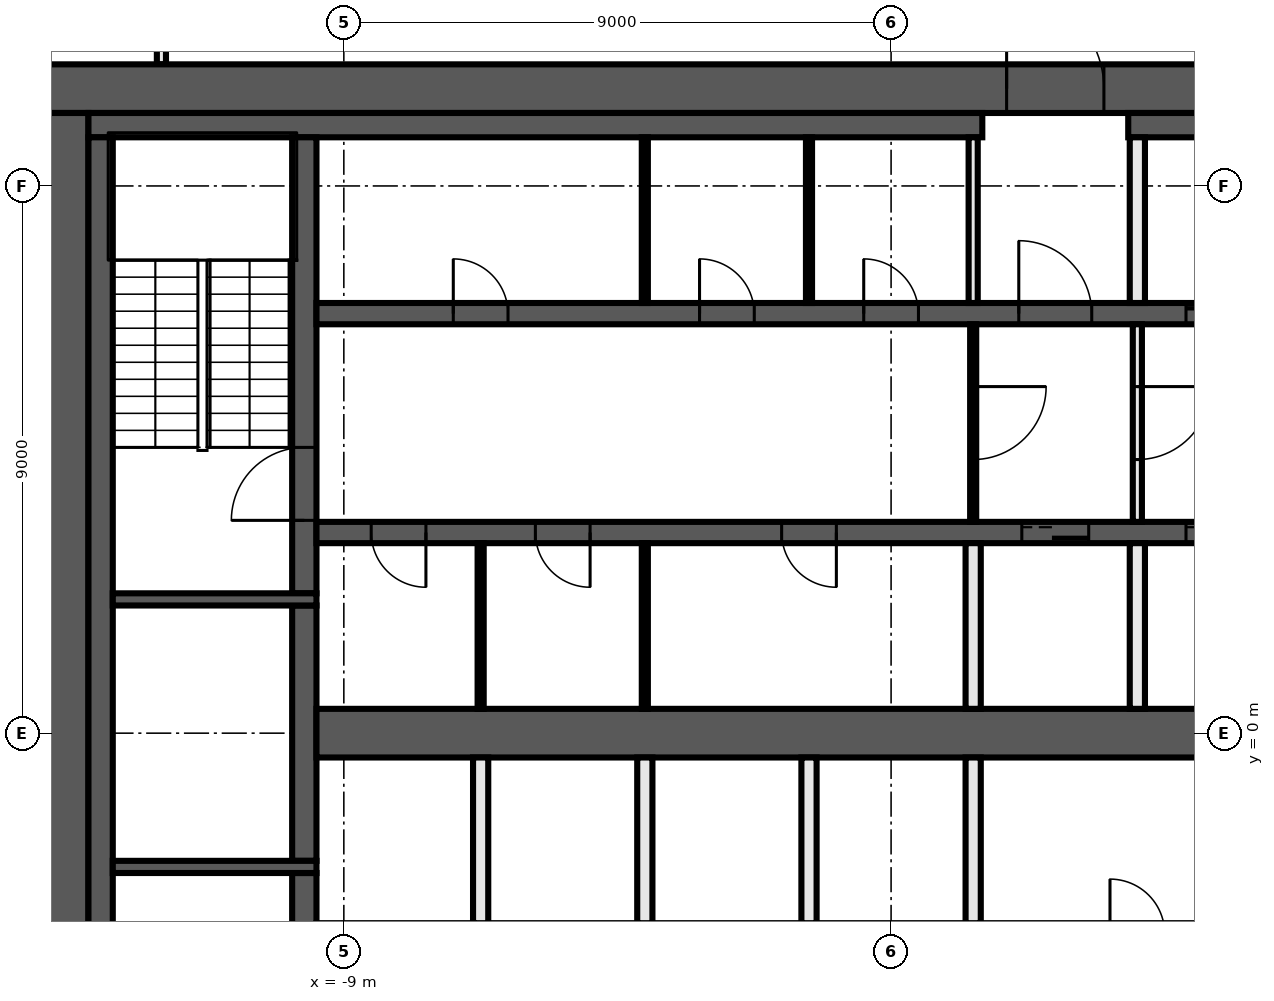
"""IFC4 building model, lengths in metres.
Left out: names, types, materials, properties, quantities, classifications, styles, units other than length and angle.
Written with IfcOpenShell. Run it as: python <this file> out.ifc"""

import sys

from ifc_helpers import new_model, si_unit, direction, frame, frame_2d, origin, place, context, subcontext, project, spatial, rectangle, extrude, element, fill, save


model = new_model("IFC4")
c1 = context("Model", 3, precision=1e-05, world=origin(), true_north=direction((0.0, 1.0)))
c2 = subcontext(c1, "Body", "Model", "MODEL_VIEW")
j1 = project(units=[si_unit("LENGTHUNIT", "METRE"), si_unit("PLANEANGLEUNIT", "RADIAN")], contexts=[c1])
p1 = place(None, origin())
s1 = spatial("IfcSite", under=j1, at=p1, CompositionType="ELEMENT")
p2 = place(p1, origin())
s2 = spatial("IfcBuilding", under=s1, at=p2, CompositionType="ELEMENT")
p3 = place(p2, frame((0.0, 0.0, 211.4)))
s3 = spatial("IfcBuildingStorey", under=s2, at=p3, CompositionType="ELEMENT", Elevation=211.4)
p4 = place(p3, frame((-12.0, 11.0, 0.0), z_axis=(0.0, 0.0, 1.0), x_axis=(0.0, 1.0, 0.0)))
e1 = element("IfcWall", 1, at=p4, inside=s3, PredefinedType="PARTITIONING", context=c2, shape_type="SweptSolid", body=[
    extrude(rectangle(XDim=2.725, YDim=0.15, at=frame_2d((1.363, 0.0))), origin(), (0.0, 0.0, 1.0), 3.82),
])
p5 = place(p3, frame((-14.0, 10.6, 0.0), z_axis=(0.0, 0.0, 1.0), x_axis=(1.0, 0.0, 0.0)))
e2 = element("IfcWall", 2, at=p5, inside=s3, PredefinedType="SHEAR", context=c2, shape_type="SweptSolid", body=[
    extrude(rectangle(XDim=28.0, YDim=0.8, at=frame_2d((14.0, 0.0))), origin(), (0.0, 0.0, 1.0), 3.82),
])
p6 = place(p5, frame((15.9, 0.0, 0.0)))
e3 = element("IfcOpeningElement", 3, at=p6, cuts=e2, PredefinedType="OPENING", context=c2, shape_type="SweptSolid", body=[
    extrude(rectangle(XDim=1.6, YDim=2.1, at=frame_2d((0.8, 1.05))), frame((0.0, 0.41, 0.0), z_axis=(0.0, -1.0, 0.0), x_axis=(1.0, 0.0, 0.0)), (0.0, 0.0, 1.0), 0.82),
])
p7 = place(p3, frame((-13.6, -10.2, 0.0), z_axis=(0.0, 0.0, 1.0), x_axis=(0.0, 1.0, 0.0)))
e4 = element("IfcWall", 4, at=p7, inside=s3, PredefinedType="SHEAR", context=c2, shape_type="SweptSolid", body=[
    extrude(rectangle(XDim=20.4, YDim=0.8, at=frame_2d((10.2, 0.0))), origin(), (0.0, 0.0, 1.0), 3.82),
])
p8 = place(p3, frame((-13.2, 10.0, 0.0), z_axis=(0.0, 0.0, 1.0), x_axis=(1.0, 0.0, 0.0)))
e5 = element("IfcWall", 5, at=p8, inside=s3, PredefinedType="SHEAR", context=c2, shape_type="SweptSolid", body=[
    extrude(rectangle(XDim=14.7, YDim=0.4, at=frame_2d((7.35, 0.0))), origin(), (0.0, 0.0, 1.0), 3.82),
])
p9 = place(p3, frame((3.9, 10.0, 0.0), z_axis=(0.0, 0.0, 1.0), x_axis=(1.0, 0.0, 0.0)))
e6 = element("IfcWall", 6, at=p9, inside=s3, PredefinedType="SHEAR", context=c2, shape_type="SweptSolid", body=[
    extrude(rectangle(XDim=9.3, YDim=0.4, at=frame_2d((4.65, 0.0))), origin(), (0.0, 0.0, 1.0), 3.82),
])
p10 = place(p3, frame((-13.0, -9.8, 0.0), z_axis=(0.0, 0.0, 1.0), x_axis=(0.0, 1.0, 0.0)))
e7 = element("IfcWall", 7, at=p10, inside=s3, PredefinedType="SHEAR", context=c2, shape_type="SweptSolid", body=[
    extrude(rectangle(XDim=19.6, YDim=0.4, at=frame_2d((9.8, 0.0))), origin(), (0.0, 0.0, 1.0), 3.82),
])
p11 = place(p3, frame((-9.65, -9.8, 0.0), z_axis=(0.0, 0.0, 1.0), x_axis=(0.0, 1.0, 0.0)))
e8 = element("IfcWall", 8, at=p11, inside=s3, PredefinedType="SHEAR", context=c2, shape_type="SweptSolid", body=[
    extrude(rectangle(XDim=7.5, YDim=0.4, at=frame_2d((3.75, 0.0))), origin(), (0.0, 0.0, 1.0), 3.82),
])
p12 = place(p11, frame((5.1, 0.0, 0.0)))
e9 = element("IfcOpeningElement", 9, at=p12, cuts=e8, PredefinedType="OPENING", context=c2, shape_type="SweptSolid", body=[
    extrude(rectangle(XDim=1.2, YDim=2.1, at=frame_2d((0.6, 1.05))), frame((0.0, 0.21, 0.0), z_axis=(0.0, -1.0, 0.0), x_axis=(1.0, 0.0, 0.0)), (0.0, 0.0, 1.0), 0.42),
])
p13 = place(p3, frame((-9.65, -2.1, 0.0), z_axis=(0.0, 0.0, 1.0), x_axis=(0.0, 1.0, 0.0)))
e10 = element("IfcWall", 10, at=p13, inside=s3, PredefinedType="SHEAR", context=c2, shape_type="SweptSolid", body=[
    extrude(rectangle(XDim=4.2, YDim=0.4, at=frame_2d((2.1, 0.0))), origin(), (0.0, 0.0, 1.0), 3.82),
])
p14 = place(p3, frame((-9.65, 2.3, 0.0), z_axis=(0.0, 0.0, 1.0), x_axis=(0.0, 1.0, 0.0)))
e11 = element("IfcWall", 11, at=p14, inside=s3, PredefinedType="SHEAR", context=c2, shape_type="SweptSolid", body=[
    extrude(rectangle(XDim=7.5, YDim=0.4, at=frame_2d((3.75, 0.0))), origin(), (0.0, 0.0, 1.0), 3.82),
])
p15 = place(p14, frame((1.2, 0.0, 0.0)))
e12 = element("IfcOpeningElement", 12, at=p15, cuts=e11, PredefinedType="OPENING", context=c2, shape_type="SweptSolid", body=[
    extrude(rectangle(XDim=1.2, YDim=2.1, at=frame_2d((0.6, 1.05))), frame((0.0, 0.21, 0.0), z_axis=(0.0, -1.0, 0.0), x_axis=(1.0, 0.0, 0.0)), (0.0, 0.0, 1.0), 0.42),
])
for number, where, z_axis, x_axis in (
    (13, (-9.45, 2.2, 0.0), (0.0, 0.0, 1.0), (-1.0, 0.0, 0.0)),
    (14, (-9.45, -2.2, 0.0), (0.0, 0.0, 1.0), (-1.0, 0.0, 0.0)),
):
    element("IfcWall", number, at=place(p3, frame(where, z_axis=z_axis, x_axis=x_axis)), inside=s3, PredefinedType="SHEAR", context=c2, shape_type="SweptSolid", body=[
        extrude(rectangle(XDim=3.35, YDim=0.2, at=frame_2d((1.675, 0.0))), origin(), (0.0, 0.0, 1.0), 3.82),
    ])
p16 = place(p3, frame((-9.45, 6.9, 0.0), z_axis=(0.0, 0.0, 1.0), x_axis=(1.0, 0.0, 0.0)))
e15 = element("IfcWall", 15, at=p16, inside=s3, PredefinedType="SHEAR", context=c2, shape_type="SweptSolid", body=[
    extrude(rectangle(XDim=18.9, YDim=0.35, at=frame_2d((9.45, 0.0))), origin(), (0.0, 0.0, 1.0), 3.82),
])
p17 = place(p16, frame((11.55, 0.0, 0.0)))
e16 = element("IfcOpeningElement", 16, at=p17, cuts=e15, PredefinedType="OPENING", context=c2, shape_type="SweptSolid", body=[
    extrude(rectangle(XDim=1.2, YDim=2.1, at=frame_2d((0.6, 1.05))), frame((0.0, 0.185, 0.0), z_axis=(0.0, -1.0, 0.0), x_axis=(1.0, 0.0, 0.0)), (0.0, 0.0, 1.0), 0.37),
])
p18 = place(p16, frame((14.3, 0.0, 0.0)))
e17 = element("IfcOpeningElement", 17, at=p18, cuts=e15, PredefinedType="OPENING", context=c2, shape_type="SweptSolid", body=[
    extrude(rectangle(XDim=1.1, YDim=2.1, at=frame_2d((0.55, 1.05))), frame((0.0, 0.185, 0.0), z_axis=(0.0, -1.0, 0.0), x_axis=(1.0, 0.0, 0.0)), (0.0, 0.0, 1.0), 0.37),
])
p19 = place(p16, frame((17.0, 0.0, 0.0)))
e18 = element("IfcOpeningElement", 18, at=p19, cuts=e15, PredefinedType="OPENING", context=c2, shape_type="SweptSolid", body=[
    extrude(rectangle(XDim=1.1, YDim=2.1, at=frame_2d((0.55, 1.05))), frame((0.0, 0.185, 0.0), z_axis=(0.0, -1.0, 0.0), x_axis=(1.0, 0.0, 0.0)), (0.0, 0.0, 1.0), 0.37),
])
p20 = place(p16, frame((2.25, 0.0, 0.0)))
e19 = element("IfcOpeningElement", 19, at=p20, cuts=e15, PredefinedType="OPENING", context=c2, shape_type="SweptSolid", body=[
    extrude(rectangle(XDim=0.9, YDim=2.1, at=frame_2d((0.45, 1.05))), frame((0.0, 0.185, 0.0), z_axis=(0.0, -1.0, 0.0), x_axis=(1.0, 0.0, 0.0)), (0.0, 0.0, 1.0), 0.37),
])
p21 = place(p16, frame((6.3, 0.0, 0.0)))
e20 = element("IfcOpeningElement", 20, at=p21, cuts=e15, PredefinedType="OPENING", context=c2, shape_type="SweptSolid", body=[
    extrude(rectangle(XDim=0.9, YDim=2.1, at=frame_2d((0.45, 1.05))), frame((0.0, 0.185, 0.0), z_axis=(0.0, -1.0, 0.0), x_axis=(1.0, 0.0, 0.0)), (0.0, 0.0, 1.0), 0.37),
])
p22 = place(p16, frame((9.0, 0.0, 0.0)))
e21 = element("IfcOpeningElement", 21, at=p22, cuts=e15, PredefinedType="OPENING", context=c2, shape_type="SweptSolid", body=[
    extrude(rectangle(XDim=0.9, YDim=2.1, at=frame_2d((0.45, 1.05))), frame((0.0, 0.185, 0.0), z_axis=(0.0, -1.0, 0.0), x_axis=(1.0, 0.0, 0.0)), (0.0, 0.0, 1.0), 0.37),
])
p23 = place(p3, frame((9.45, 3.3, 0.0), z_axis=(0.0, 0.0, 1.0), x_axis=(-1.0, 0.0, 0.0)))
e22 = element("IfcWall", 22, at=p23, inside=s3, PredefinedType="SHEAR", context=c2, shape_type="SweptSolid", body=[
    extrude(rectangle(XDim=18.9, YDim=0.35, at=frame_2d((9.45, 0.0))), origin(), (0.0, 0.0, 1.0), 3.82),
])
p24 = place(p23, frame((6.2, 0.0, 0.0)))
e23 = element("IfcOpeningElement", 23, at=p24, cuts=e22, PredefinedType="OPENING", context=c2, shape_type="SweptSolid", body=[
    extrude(rectangle(XDim=1.1, YDim=2.1, at=frame_2d((0.55, 1.05))), frame((0.0, 0.185, 0.0), z_axis=(0.0, -1.0, 0.0), x_axis=(1.0, 0.0, 0.0)), (0.0, 0.0, 1.0), 0.37),
])
p25 = place(p23, frame((3.5, 0.0, 0.0)))
e24 = element("IfcOpeningElement", 24, at=p25, cuts=e22, PredefinedType="OPENING", context=c2, shape_type="SweptSolid", body=[
    extrude(rectangle(XDim=1.1, YDim=2.1, at=frame_2d((0.55, 1.05))), frame((0.0, 0.185, 0.0), z_axis=(0.0, -1.0, 0.0), x_axis=(1.0, 0.0, 0.0)), (0.0, 0.0, 1.0), 0.37),
])
p26 = place(p23, frame((0.9, 0.0, 0.0)))
e25 = element("IfcOpeningElement", 25, at=p26, cuts=e22, PredefinedType="OPENING", context=c2, shape_type="SweptSolid", body=[
    extrude(rectangle(XDim=0.9, YDim=2.1, at=frame_2d((0.45, 1.05))), frame((0.0, 0.185, 0.0), z_axis=(0.0, -1.0, 0.0), x_axis=(1.0, 0.0, 0.0)), (0.0, 0.0, 1.0), 0.37),
])
p27 = place(p23, frame((17.1, 0.0, 0.0)))
e26 = element("IfcOpeningElement", 26, at=p27, cuts=e22, PredefinedType="OPENING", context=c2, shape_type="SweptSolid", body=[
    extrude(rectangle(XDim=0.9, YDim=2.1, at=frame_2d((0.45, 1.05))), frame((0.0, 0.185, 0.0), z_axis=(0.0, -1.0, 0.0), x_axis=(1.0, 0.0, 0.0)), (0.0, 0.0, 1.0), 0.37),
])
p28 = place(p23, frame((14.4, 0.0, 0.0)))
e27 = element("IfcOpeningElement", 27, at=p28, cuts=e22, PredefinedType="OPENING", context=c2, shape_type="SweptSolid", body=[
    extrude(rectangle(XDim=0.9, YDim=2.1, at=frame_2d((0.45, 1.05))), frame((0.0, 0.185, 0.0), z_axis=(0.0, -1.0, 0.0), x_axis=(1.0, 0.0, 0.0)), (0.0, 0.0, 1.0), 0.37),
])
p29 = place(p23, frame((10.35, 0.0, 0.0)))
e28 = element("IfcOpeningElement", 28, at=p29, cuts=e22, PredefinedType="OPENING", context=c2, shape_type="SweptSolid", body=[
    extrude(rectangle(XDim=0.9, YDim=2.1, at=frame_2d((0.45, 1.05))), frame((0.0, 0.185, 0.0), z_axis=(0.0, -1.0, 0.0), x_axis=(1.0, 0.0, 0.0)), (0.0, 0.0, 1.0), 0.37),
])
p30 = place(p3, frame((-9.45, 0.0, 0.0), z_axis=(0.0, 0.0, 1.0), x_axis=(1.0, 0.0, 0.0)))
e29 = element("IfcWall", 29, at=p30, inside=s3, PredefinedType="SHEAR", context=c2, shape_type="SweptSolid", body=[
    extrude(rectangle(XDim=18.9, YDim=0.8, at=frame_2d((9.45, 0.0))), origin(), (0.0, 0.0, 1.0), 3.82),
])
p31 = place(p3, frame((4.05, 6.725, 0.0), z_axis=(0.0, 0.0, 1.0), x_axis=(0.0, -1.0, 0.0)))
e30 = element("IfcWall", 30, at=p31, inside=s3, PredefinedType="PARTITIONING", context=c2, shape_type="SweptSolid", body=[
    extrude(rectangle(XDim=3.25, YDim=0.15, at=frame_2d((1.625, 0.0))), origin(), (0.0, 0.0, 1.0), 3.82),
])
p32 = place(p31, frame((1.025, 0.0, 0.0)))
e31 = element("IfcOpeningElement", 31, at=p32, cuts=e30, PredefinedType="OPENING", context=c2, shape_type="SweptSolid", body=[
    extrude(rectangle(XDim=1.2, YDim=2.1, at=frame_2d((0.6, 1.05))), frame((0.0, 0.085, 0.0), z_axis=(0.0, -1.0, 0.0), x_axis=(1.0, 0.0, 0.0)), (0.0, 0.0, 1.0), 0.17),
])
for number, where, z_axis, x_axis in (
    (32, (4.05, 0.4, 0.0), (0.0, 0.0, 1.0), (0.0, 1.0, 0.0)),
    (33, (4.05, 7.075, 0.0), (0.0, 0.0, 1.0), (0.0, 1.0, 0.0)),
):
    element("IfcWall", number, at=place(p3, frame(where, z_axis=z_axis, x_axis=x_axis)), inside=s3, PredefinedType="SOLIDWALL", context=c2, shape_type="SweptSolid", body=[
        extrude(rectangle(XDim=2.725, YDim=0.25, at=frame_2d((1.363, 0.0))), origin(), (0.0, 0.0, 1.0), 3.82),
    ])
p33 = place(p3, frame((1.35, 7.075, 0.0), z_axis=(0.0, 0.0, 1.0), x_axis=(0.0, 1.0, 0.0)))
e34 = element("IfcWall", 34, at=p33, inside=s3, PredefinedType="PARTITIONING", context=c2, shape_type="SweptSolid", body=[
    extrude(rectangle(XDim=2.725, YDim=0.15, at=frame_2d((1.363, 0.0))), origin(), (0.0, 0.0, 1.0), 3.82),
])
p34 = place(p3, frame((1.35, 6.725, 0.0), z_axis=(0.0, 0.0, 1.0), x_axis=(0.0, -1.0, 0.0)))
e35 = element("IfcWall", 35, at=p34, inside=s3, PredefinedType="PARTITIONING", context=c2, shape_type="SweptSolid", body=[
    extrude(rectangle(XDim=3.25, YDim=0.1, at=frame_2d((1.625, 0.0))), origin(), (0.0, 0.0, 1.0), 3.82),
])
p35 = place(p34, frame((1.025, 0.0, 0.0)))
e36 = element("IfcOpeningElement", 36, at=p35, cuts=e35, PredefinedType="OPENING", context=c2, shape_type="SweptSolid", body=[
    extrude(rectangle(XDim=1.2, YDim=2.1, at=frame_2d((0.6, 1.05))), frame((0.0, 0.06, 0.0), z_axis=(0.0, -1.0, 0.0), x_axis=(1.0, 0.0, 0.0)), (0.0, 0.0, 1.0), 0.12),
])
for number, where, z_axis, x_axis in (
    (37, (1.35, -3.125, 0.0), (0.0, 0.0, 1.0), (0.0, 1.0, 0.0)),
    (38, (1.35, 0.4, 0.0), (0.0, 0.0, 1.0), (0.0, 1.0, 0.0)),
):
    element("IfcWall", number, at=place(p3, frame(where, z_axis=z_axis, x_axis=x_axis)), inside=s3, PredefinedType="SOLIDWALL", context=c2, shape_type="SweptSolid", body=[
        extrude(rectangle(XDim=2.725, YDim=0.25, at=frame_2d((1.363, 0.0))), origin(), (0.0, 0.0, 1.0), 3.82),
    ])
p36 = place(p3, frame((-1.35, 7.075, 0.0), z_axis=(0.0, 0.0, 1.0), x_axis=(0.0, 1.0, 0.0)))
e39 = element("IfcWall", 39, at=p36, inside=s3, PredefinedType="PARTITIONING", context=c2, shape_type="SweptSolid", body=[
    extrude(rectangle(XDim=2.725, YDim=0.1, at=frame_2d((1.363, 0.0))), origin(), (0.0, 0.0, 1.0), 3.82),
])
p37 = place(p3, frame((-1.35, -3.125, 0.0), z_axis=(0.0, 0.0, 1.0), x_axis=(0.0, 1.0, 0.0)))
e40 = element("IfcWall", 40, at=p37, inside=s3, PredefinedType="SOLIDWALL", context=c2, shape_type="SweptSolid", body=[
    extrude(rectangle(XDim=2.725, YDim=0.25, at=frame_2d((1.363, 0.0))), origin(), (0.0, 0.0, 1.0), 3.82),
])
for number, where, z_axis, x_axis in (
    (41, (-4.05, 0.4, 0.0), (0.0, 0.0, 1.0), (0.0, 1.0, 0.0)),
    (42, (-4.05, 7.075, 0.0), (0.0, 0.0, 1.0), (0.0, 1.0, 0.0)),
):
    element("IfcWall", number, at=place(p3, frame(where, z_axis=z_axis, x_axis=x_axis)), inside=s3, PredefinedType="PARTITIONING", context=c2, shape_type="SweptSolid", body=[
        extrude(rectangle(XDim=2.725, YDim=0.1, at=frame_2d((1.363, 0.0))), origin(), (0.0, 0.0, 1.0), 3.82),
    ])
p38 = place(p3, frame((-4.05, -3.125, 0.0), z_axis=(0.0, 0.0, 1.0), x_axis=(0.0, 1.0, 0.0)))
e43 = element("IfcWall", 43, at=p38, inside=s3, PredefinedType="SOLIDWALL", context=c2, shape_type="SweptSolid", body=[
    extrude(rectangle(XDim=2.725, YDim=0.25, at=frame_2d((1.363, 0.0))), origin(), (0.0, 0.0, 1.0), 3.82),
])
p39 = place(p3, frame((-6.75, 0.4, 0.0), z_axis=(0.0, 0.0, 1.0), x_axis=(0.0, 1.0, 0.0)))
e44 = element("IfcWall", 44, at=p39, inside=s3, PredefinedType="PARTITIONING", context=c2, shape_type="SweptSolid", body=[
    extrude(rectangle(XDim=2.725, YDim=0.1, at=frame_2d((1.363, 0.0))), origin(), (0.0, 0.0, 1.0), 3.82),
])
p40 = place(p3, frame((-6.75, -3.125, 0.0), z_axis=(0.0, 0.0, 1.0), x_axis=(0.0, 1.0, 0.0)))
e45 = element("IfcWall", 45, at=p40, inside=s3, PredefinedType="SOLIDWALL", context=c2, shape_type="SweptSolid", body=[
    extrude(rectangle(XDim=2.725, YDim=0.25, at=frame_2d((1.363, 0.0))), origin(), (0.0, 0.0, 1.0), 3.82),
])
p41 = place(p6, origin())
e46 = element("IfcDoor", 46, at=p41, inside=s3, OperationType="DOUBLE_DOOR_SINGLE_SWING", PredefinedType="DOOR", context=c2, shape_type="SweptSolid", body=[
    extrude(rectangle(XDim=1.6, YDim=2.1, at=frame_2d((0.8, 1.05))), frame((0.0, 0.025, 0.0), z_axis=(0.0, -1.0, 0.0), x_axis=(1.0, 0.0, 0.0)), (0.0, 0.0, 1.0), 0.05),
])
fill(e3, e46)
p42 = place(p17, origin())
e47 = element("IfcDoor", 47, at=p42, inside=s3, OperationType="SINGLE_SWING_LEFT", PredefinedType="DOOR", context=c2, shape_type="SweptSolid", body=[
    extrude(rectangle(XDim=1.2, YDim=2.1, at=frame_2d((0.6, 1.05))), frame((0.0, 0.025, 0.0), z_axis=(0.0, -1.0, 0.0), x_axis=(1.0, 0.0, 0.0)), (0.0, 0.0, 1.0), 0.05),
])
fill(e16, e47)
p43 = place(p18, origin())
e48 = element("IfcDoor", 48, at=p43, inside=s3, OperationType="DOUBLE_DOOR_SLIDING", PredefinedType="DOOR", context=c2, shape_type="SweptSolid", body=[
    extrude(rectangle(XDim=1.1, YDim=2.1, at=frame_2d((0.55, 1.05))), frame((0.0, 0.025, 0.0), z_axis=(0.0, -1.0, 0.0), x_axis=(1.0, 0.0, 0.0)), (0.0, 0.0, 1.0), 0.05),
])
fill(e17, e48)
p44 = place(p24, origin())
e49 = element("IfcDoor", 49, at=p44, inside=s3, OperationType="DOUBLE_DOOR_SLIDING", PredefinedType="DOOR", context=c2, shape_type="SweptSolid", body=[
    extrude(rectangle(XDim=1.1, YDim=2.1, at=frame_2d((0.55, 1.05))), frame((0.0, 0.025, 0.0), z_axis=(0.0, -1.0, 0.0), x_axis=(1.0, 0.0, 0.0)), (0.0, 0.0, 1.0), 0.05),
])
fill(e23, e49)
p45 = place(p25, origin())
e50 = element("IfcDoor", 50, at=p45, inside=s3, OperationType="DOUBLE_DOOR_SLIDING", PredefinedType="DOOR", context=c2, shape_type="SweptSolid", body=[
    extrude(rectangle(XDim=1.1, YDim=2.1, at=frame_2d((0.55, 1.05))), frame((0.0, 0.025, 0.0), z_axis=(0.0, -1.0, 0.0), x_axis=(1.0, 0.0, 0.0)), (0.0, 0.0, 1.0), 0.05),
])
fill(e24, e50)
p46 = place(p20, origin())
e51 = element("IfcDoor", 51, at=p46, inside=s3, OperationType="SINGLE_SWING_RIGHT", PredefinedType="DOOR", context=c2, shape_type="SweptSolid", body=[
    extrude(rectangle(XDim=0.9, YDim=2.1, at=frame_2d((0.45, 1.05))), frame((0.0, 0.025, 0.0), z_axis=(0.0, -1.0, 0.0), x_axis=(1.0, 0.0, 0.0)), (0.0, 0.0, 1.0), 0.05),
])
fill(e19, e51)
p47 = place(p21, origin())
e52 = element("IfcDoor", 52, at=p47, inside=s3, OperationType="SINGLE_SWING_LEFT", PredefinedType="DOOR", context=c2, shape_type="SweptSolid", body=[
    extrude(rectangle(XDim=0.9, YDim=2.1, at=frame_2d((0.45, 1.05))), frame((0.0, 0.025, 0.0), z_axis=(0.0, -1.0, 0.0), x_axis=(1.0, 0.0, 0.0)), (0.0, 0.0, 1.0), 0.05),
])
fill(e20, e52)
p48 = place(p22, origin())
e53 = element("IfcDoor", 53, at=p48, inside=s3, OperationType="SINGLE_SWING_RIGHT", PredefinedType="DOOR", context=c2, shape_type="SweptSolid", body=[
    extrude(rectangle(XDim=0.9, YDim=2.1, at=frame_2d((0.45, 1.05))), frame((0.0, 0.025, 0.0), z_axis=(0.0, -1.0, 0.0), x_axis=(1.0, 0.0, 0.0)), (0.0, 0.0, 1.0), 0.05),
])
fill(e21, e53)
p49 = place(p27, origin())
e54 = element("IfcDoor", 54, at=p49, inside=s3, OperationType="SINGLE_SWING_LEFT", PredefinedType="DOOR", context=c2, shape_type="SweptSolid", body=[
    extrude(rectangle(XDim=0.9, YDim=2.1, at=frame_2d((0.45, 1.05))), frame((0.0, 0.025, 0.0), z_axis=(0.0, -1.0, 0.0), x_axis=(1.0, 0.0, 0.0)), (0.0, 0.0, 1.0), 0.05),
])
fill(e26, e54)
p50 = place(p28, origin())
e55 = element("IfcDoor", 55, at=p50, inside=s3, OperationType="SINGLE_SWING_RIGHT", PredefinedType="DOOR", context=c2, shape_type="SweptSolid", body=[
    extrude(rectangle(XDim=0.9, YDim=2.1, at=frame_2d((0.45, 1.05))), frame((0.0, 0.025, 0.0), z_axis=(0.0, -1.0, 0.0), x_axis=(1.0, 0.0, 0.0)), (0.0, 0.0, 1.0), 0.05),
])
fill(e27, e55)
p51 = place(p29, origin())
e56 = element("IfcDoor", 56, at=p51, inside=s3, OperationType="SINGLE_SWING_LEFT", PredefinedType="DOOR", context=c2, shape_type="SweptSolid", body=[
    extrude(rectangle(XDim=0.9, YDim=2.1, at=frame_2d((0.45, 1.05))), frame((0.0, 0.025, 0.0), z_axis=(0.0, -1.0, 0.0), x_axis=(1.0, 0.0, 0.0)), (0.0, 0.0, 1.0), 0.05),
])
fill(e28, e56)
p52 = place(p15, origin())
e57 = element("IfcDoor", 57, at=p52, inside=s3, OperationType="SINGLE_SWING_RIGHT", PredefinedType="DOOR", context=c2, shape_type="SweptSolid", body=[
    extrude(rectangle(XDim=1.2, YDim=2.1, at=frame_2d((0.6, 1.05))), frame((0.0, 0.025, 0.0), z_axis=(0.0, -1.0, 0.0), x_axis=(1.0, 0.0, 0.0)), (0.0, 0.0, 1.0), 0.05),
])
fill(e12, e57)
p53 = place(p35, origin())
e58 = element("IfcDoor", 58, at=p53, inside=s3, OperationType="SINGLE_SWING_LEFT", PredefinedType="DOOR", context=c2, shape_type="SweptSolid", body=[
    extrude(rectangle(XDim=1.2, YDim=2.1, at=frame_2d((0.6, 1.05))), frame((0.0, 0.025, 0.0), z_axis=(0.0, -1.0, 0.0), x_axis=(1.0, 0.0, 0.0)), (0.0, 0.0, 1.0), 0.05),
])
fill(e36, e58)
p54 = place(p32, origin())
e59 = element("IfcDoor", 59, at=p54, inside=s3, OperationType="SINGLE_SWING_RIGHT", PredefinedType="DOOR", context=c2, shape_type="SweptSolid", body=[
    extrude(rectangle(XDim=1.2, YDim=2.1, at=frame_2d((0.6, 1.05))), frame((0.0, 0.025, 0.0), z_axis=(0.0, -1.0, 0.0), x_axis=(1.0, 0.0, 0.0)), (0.0, 0.0, 1.0), 0.05),
])
fill(e31, e59)
save(model, sys.argv[1])
